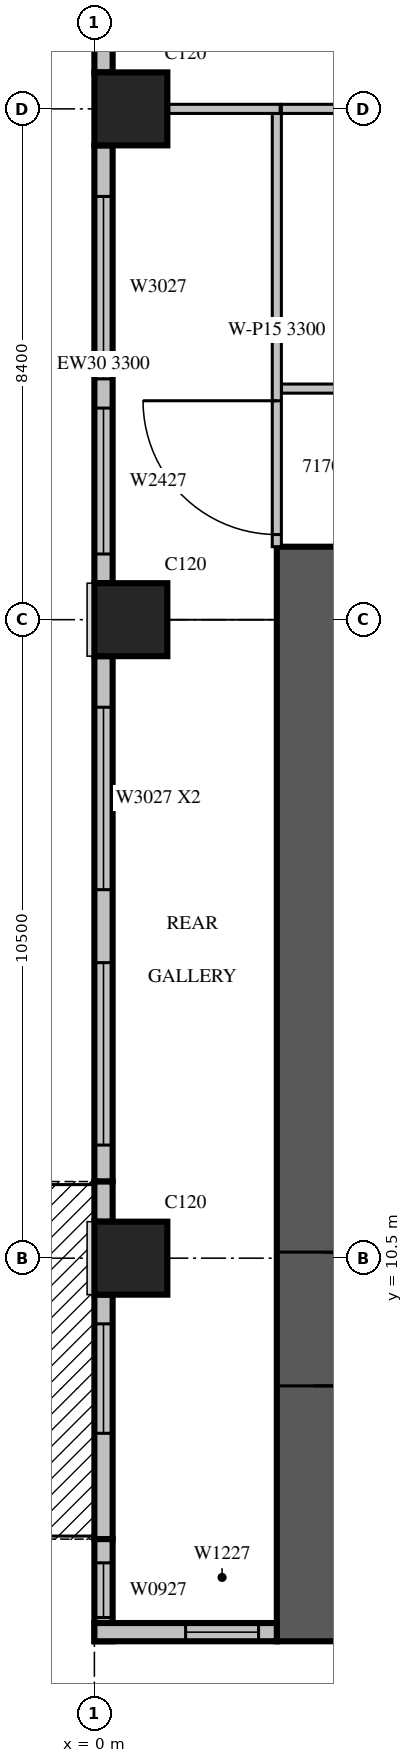
"""IFC4 building model, lengths in metres.
Left out: names, types, materials, properties, quantities, classifications, styles, units other than length and angle.
Written with IfcOpenShell. Run it as: python <this file> out.ifc"""

import sys

from ifc_helpers import new_model, si_unit, direction, frame, frame_2d, origin, origin_2d, place, context, subcontext, project, spatial, rectangle, extrude, source, transform, mapped, element, fill, save


model = new_model("IFC4")
c1 = context("Model", 3, precision=1e-05, world=origin(), true_north=direction((0.0, 1.0)))
c2 = subcontext(c1, "Body", "Model", "MODEL_VIEW")
j1 = project(units=[si_unit("LENGTHUNIT", "METRE"), si_unit("PLANEANGLEUNIT", "RADIAN")], contexts=[c1])
p1 = place(None, origin())
s1 = spatial("IfcSite", under=j1, at=p1, CompositionType="ELEMENT")
p2 = place(p1, origin())
s2 = spatial("IfcBuilding", under=s1, at=p2, CompositionType="ELEMENT")
p3 = place(p2, frame((0.0, 0.0, 82.5)))
s3 = spatial("IfcBuildingStorey", under=s2, at=p3, CompositionType="ELEMENT", Elevation=82.5)
m1 = source(origin(), c2, "Body", "SweptSolid", [
    extrude(rectangle(XDim=1.2, YDim=1.2, at=origin_2d()), origin(), (0.0, 0.0, 1.0), 4.2),
])
for number, where, z_axis, x_axis in (
    (1, (0.6, 10.5, 0.0), (0.0, 0.0, 1.0), (1.0, 0.0, 0.0)),
    (2, (0.6, 21.0, 0.0), (0.0, 0.0, 1.0), (1.0, 0.0, 0.0)),
    (3, (0.6, 29.4, 0.0), (0.0, 0.0, 1.0), (1.0, 0.0, 0.0)),
):
    element("IfcColumn", number, at=place(p3, frame(where, z_axis=z_axis, x_axis=x_axis)), inside=s3, PredefinedType="COLUMN", context=c2, shape_type="MappedRepresentation", body=[
        mapped(m1, transform((0.0, 0.0, 0.0), scale=1.0)),
    ])
m2 = source(origin(), c2, "Body", "SweptSolid", [
    extrude(rectangle(XDim=18.0, YDim=1.2, at=frame_2d((9.0, 0.0))), origin(), (0.0, 0.0, 1.0), 4.2),
])
p4 = place(p3, frame((3.6, 4.2, 0.0), z_axis=(0.0, 0.0, 1.0), x_axis=(0.0, 1.0, 0.0)))
e4 = element("IfcWall", 4, at=p4, inside=s3, PredefinedType="SHEAR", context=c2, shape_type="MappedRepresentation", body=[
    mapped(m2, transform((0.0, 0.0, 0.0), scale=1.0)),
])
m3 = source(origin(), c2, "Body", "SweptSolid", [
    extrude(rectangle(XDim=2.2, YDim=2.1, at=frame_2d((1.1, 1.05))), frame((0.0, 0.61, 0.0), z_axis=(0.0, -1.0, 0.0), x_axis=(1.0, 0.0, 0.0)), (0.0, 0.0, 1.0), 1.22),
])
p5 = place(p4, frame((4.2, 0.0, 0.0)))
e5 = element("IfcOpeningElement", 5, at=p5, cuts=e4, PredefinedType="OPENING", context=c2, shape_type="MappedRepresentation", body=[
    mapped(m3, transform((0.0, 0.0, 0.0), scale=1.0)),
])
m4 = source(origin(), c2, "Body", "SweptSolid", [
    extrude(rectangle(XDim=7.2, YDim=0.3, at=frame_2d((3.6, 0.0))), origin(), (0.0, 0.0, 1.0), 3.8),
])
p6 = place(p3, frame((0.15, 37.2, 0.0), z_axis=(0.0, 0.0, 1.0), x_axis=(0.0, -1.0, 0.0)))
e6 = element("IfcWall", 6, at=p6, inside=s3, PredefinedType="STANDARD", context=c2, shape_type="MappedRepresentation", body=[
    mapped(m4, transform((0.0, 0.0, 0.0), scale=1.0)),
])
m5 = source(origin(), c2, "Body", "SweptSolid", [
    extrude(rectangle(XDim=1.8, YDim=2.7, at=frame_2d((0.9, 1.35))), frame((0.0, 0.16, 0.0), z_axis=(0.0, -1.0, 0.0), x_axis=(1.0, 0.0, 0.0)), (0.0, 0.0, 1.0), 0.32),
])
p7 = place(p6, frame((1.008, 0.0, 0.6)))
e7 = element("IfcOpeningElement", 7, at=p7, cuts=e6, PredefinedType="OPENING", context=c2, shape_type="MappedRepresentation", body=[
    mapped(m5, transform((0.0, 0.0, 0.0), scale=1.0)),
])
m6 = source(origin(), c2, "Body", "SweptSolid", [
    extrude(rectangle(XDim=2.4, YDim=2.7, at=frame_2d((1.2, 1.35))), frame((0.0, 0.16, 0.0), z_axis=(0.0, -1.0, 0.0), x_axis=(1.0, 0.0, 0.0)), (0.0, 0.0, 1.0), 0.32),
])
p8 = place(p6, frame((3.804, 0.0, 0.6)))
e8 = element("IfcOpeningElement", 8, at=p8, cuts=e6, PredefinedType="OPENING", context=c2, shape_type="MappedRepresentation", body=[
    mapped(m6, transform((0.0, 0.0, 0.0), scale=1.0)),
])
m7 = source(origin(), c2, "Body", "SweptSolid", [
    extrude(rectangle(XDim=7.2, YDim=0.3, at=frame_2d((3.6, 0.0))), origin(), (0.0, 0.0, 1.0), 3.3),
])
p9 = place(p3, frame((0.15, 28.8, 0.0), z_axis=(0.0, 0.0, 1.0), x_axis=(0.0, -1.0, 0.0)))
e9 = element("IfcWall", 9, at=p9, inside=s3, PredefinedType="STANDARD", context=c2, shape_type="MappedRepresentation", body=[
    mapped(m7, transform((0.0, 0.0, 0.0), scale=1.0)),
])
m8 = source(origin(), c2, "Body", "SweptSolid", [
    extrude(rectangle(XDim=3.0, YDim=2.7, at=frame_2d((1.5, 1.35))), frame((0.0, 0.16, 0.0), z_axis=(0.0, -1.0, 0.0), x_axis=(1.0, 0.0, 0.0)), (0.0, 0.0, 1.0), 0.32),
])
p10 = place(p9, frame((0.84, 0.0, 0.6)))
e10 = element("IfcOpeningElement", 10, at=p10, cuts=e9, PredefinedType="OPENING", context=c2, shape_type="MappedRepresentation", body=[
    mapped(m8, transform((0.0, 0.0, 0.0), scale=1.0)),
])
p11 = place(p9, frame((4.32, 0.0, 0.6)))
e11 = element("IfcOpeningElement", 11, at=p11, cuts=e9, PredefinedType="OPENING", context=c2, shape_type="MappedRepresentation", body=[
    mapped(m6, transform((0.0, 0.0, 0.0), scale=1.0)),
])
p12 = place(p3, frame((0.15, 20.4, 0.0), z_axis=(0.0, 0.0, 1.0), x_axis=(0.0, -1.0, 0.0)))
e12 = element("IfcWall", 12, at=p12, inside=s3, PredefinedType="STANDARD", context=c2, shape_type="SweptSolid", body=[
    extrude(rectangle(XDim=8.64, YDim=0.3, at=frame_2d((4.32, 0.0))), origin(), (0.0, 0.0, 1.0), 3.8),
])
p13 = place(p12, frame((0.84, 0.0, 0.6)))
e13 = element("IfcOpeningElement", 13, at=p13, cuts=e12, PredefinedType="OPENING", context=c2, shape_type="MappedRepresentation", body=[
    mapped(m8, transform((0.0, 0.0, 0.0), scale=1.0)),
])
p14 = place(p12, frame((5.04, 0.0, 0.6)))
e14 = element("IfcOpeningElement", 14, at=p14, cuts=e12, PredefinedType="OPENING", context=c2, shape_type="MappedRepresentation", body=[
    mapped(m8, transform((0.0, 0.0, 0.0), scale=1.0)),
])
p15 = place(p3, frame((0.15, 11.76, 0.0), z_axis=(0.0, 0.0, 1.0), x_axis=(0.0, -1.0, 0.0)))
e15 = element("IfcWall", 15, at=p15, inside=s3, PredefinedType="STANDARD", context=c2, shape_type="SweptSolid", body=[
    extrude(rectangle(XDim=0.66, YDim=0.3, at=frame_2d((0.33, 0.0))), origin(), (0.0, 0.0, 1.0), 3.8),
])
p16 = place(p3, frame((0.15, 9.9, 0.0), z_axis=(0.0, 0.0, 1.0), x_axis=(0.0, -1.0, 0.0)))
e16 = element("IfcWall", 16, at=p16, inside=s3, PredefinedType="STANDARD", context=c2, shape_type="SweptSolid", body=[
    extrude(rectangle(XDim=4.02, YDim=0.3, at=frame_2d((2.01, 0.0))), origin(), (0.0, 0.0, 1.0), 3.8),
])
m9 = source(origin(), c2, "Body", "SweptSolid", [
    extrude(rectangle(XDim=1.8, YDim=2.4, at=frame_2d((0.9, 1.2))), frame((0.0, 0.16, 0.0), z_axis=(0.0, -1.0, 0.0), x_axis=(1.0, 0.0, 0.0)), (0.0, 0.0, 1.0), 0.32),
])
p17 = place(p16, frame((0.48, 0.0, 0.0)))
e17 = element("IfcOpeningElement", 17, at=p17, cuts=e16, PredefinedType="OPENING", context=c2, shape_type="MappedRepresentation", body=[
    mapped(m9, transform((0.0, 0.0, 0.0), scale=1.0)),
])
m10 = source(origin(), c2, "Body", "SweptSolid", [
    extrude(rectangle(XDim=1.68, YDim=0.3, at=frame_2d((0.84, 0.0))), origin(), (0.0, 0.0, 1.0), 3.8),
])
p18 = place(p3, frame((0.15, 5.88, 0.0), z_axis=(0.0, 0.0, 1.0), x_axis=(0.0, -1.0, 0.0)))
e18 = element("IfcWall", 18, at=p18, inside=s3, PredefinedType="STANDARD", context=c2, shape_type="MappedRepresentation", body=[
    mapped(m10, transform((0.0, 0.0, 0.0), scale=1.0)),
])
m11 = source(origin(), c2, "Body", "SweptSolid", [
    extrude(rectangle(XDim=0.9, YDim=2.7, at=frame_2d((0.45, 1.35))), frame((0.0, 0.16, 0.0), z_axis=(0.0, -1.0, 0.0), x_axis=(1.0, 0.0, 0.0)), (0.0, 0.0, 1.0), 0.32),
])
p19 = place(p18, frame((0.39, 0.0, 0.6)))
e19 = element("IfcOpeningElement", 19, at=p19, cuts=e18, PredefinedType="OPENING", context=c2, shape_type="MappedRepresentation", body=[
    mapped(m11, transform((0.0, 0.0, 0.0), scale=1.0)),
])
m12 = source(origin(), c2, "Body", "SweptSolid", [
    extrude(rectangle(XDim=3.0, YDim=0.3, at=frame_2d((1.5, 0.0))), origin(), (0.0, 0.0, 1.0), 3.8),
])
p20 = place(p3, frame((0.0, 4.35, 0.0), z_axis=(0.0, 0.0, 1.0), x_axis=(1.0, 0.0, 0.0)))
e20 = element("IfcWall", 20, at=p20, inside=s3, PredefinedType="STANDARD", context=c2, shape_type="MappedRepresentation", body=[
    mapped(m12, transform((0.0, 0.0, 0.0), scale=1.0)),
])
m13 = source(origin(), c2, "Body", "SweptSolid", [
    extrude(rectangle(XDim=1.2, YDim=2.7, at=frame_2d((0.6, 1.35))), frame((0.0, 0.16, 0.0), z_axis=(0.0, -1.0, 0.0), x_axis=(1.0, 0.0, 0.0)), (0.0, 0.0, 1.0), 0.32),
])
p21 = place(p20, frame((1.5, 0.0, 0.6)))
e21 = element("IfcOpeningElement", 21, at=p21, cuts=e20, PredefinedType="OPENING", context=c2, shape_type="MappedRepresentation", body=[
    mapped(m13, transform((0.0, 0.0, 0.0), scale=1.0)),
])
m14 = source(origin(), c2, "Body", "SweptSolid", [
    extrude(rectangle(XDim=11.625, YDim=0.15, at=frame_2d((5.812, 0.0))), origin(), (0.0, 0.0, 1.0), 2.8),
])
p22 = place(p3, frame((3.075, 24.8, 0.0), z_axis=(0.0, 0.0, 1.0), x_axis=(1.0, 0.0, 0.0)))
e22 = element("IfcWall", 22, at=p22, inside=s3, PredefinedType="PARTITIONING", context=c2, shape_type="MappedRepresentation", body=[
    mapped(m14, transform((0.0, 0.0, 0.0), scale=1.0)),
])
m15 = source(origin(), c2, "Body", "SweptSolid", [
    extrude(rectangle(XDim=0.9, YDim=2.1, at=frame_2d((0.45, 1.05))), frame((0.0, 0.085, 0.0), z_axis=(0.0, -1.0, 0.0), x_axis=(1.0, 0.0, 0.0)), (0.0, 0.0, 1.0), 0.17),
])
p23 = place(p22, frame((2.663, 0.0, 0.0)))
e23 = element("IfcOpeningElement", 23, at=p23, cuts=e22, PredefinedType="OPENING", context=c2, shape_type="MappedRepresentation", body=[
    mapped(m15, transform((0.0, 0.0, 0.0), scale=1.0)),
])
p24 = place(p22, frame((9.35, 0.0, 0.0)))
e24 = element("IfcOpeningElement", 24, at=p24, cuts=e22, PredefinedType="OPENING", context=c2, shape_type="MappedRepresentation", body=[
    mapped(m15, transform((0.0, 0.0, 0.0), scale=1.0)),
])
m16 = source(origin(), c2, "Body", "SweptSolid", [
    extrude(rectangle(XDim=6.826, YDim=0.15, at=frame_2d((3.413, 0.0))), origin(), (0.0, 0.0, 1.0), 3.8),
])
p25 = place(p3, frame((9.901, 29.4, 0.0), z_axis=(0.0, 0.0, 1.0), x_axis=(-1.0, 0.0, 0.0)))
e25 = element("IfcWall", 25, at=p25, inside=s3, PredefinedType="PARTITIONING", context=c2, shape_type="MappedRepresentation", body=[
    mapped(m16, transform((0.0, 0.0, 0.0), scale=1.0)),
])
m17 = source(origin(), c2, "Body", "SweptSolid", [
    extrude(rectangle(XDim=7.125, YDim=0.15, at=frame_2d((3.562, 0.0))), origin(), (0.0, 0.0, 1.0), 3.3),
])
p26 = place(p3, frame((3.0, 29.325, 0.0), z_axis=(0.0, 0.0, 1.0), x_axis=(0.0, -1.0, 0.0)))
e26 = element("IfcWall", 26, at=p26, inside=s3, PredefinedType="PARTITIONING", context=c2, shape_type="MappedRepresentation", body=[
    mapped(m17, transform((0.0, 0.0, 0.0), scale=1.0)),
])
m18 = source(origin(), c2, "Body", "SweptSolid", [
    extrude(rectangle(XDim=2.2, YDim=2.1, at=frame_2d((1.1, 1.05))), frame((0.0, 0.085, 0.0), z_axis=(0.0, -1.0, 0.0), x_axis=(1.0, 0.0, 0.0)), (0.0, 0.0, 1.0), 0.17),
])
p27 = place(p26, frame((4.725, 0.0, 0.0)))
e27 = element("IfcOpeningElement", 27, at=p27, cuts=e26, PredefinedType="OPENING", context=c2, shape_type="MappedRepresentation", body=[
    mapped(m18, transform((0.0, 0.0, 0.0), scale=1.0)),
])
m19 = source(origin(), c2, "Body", "SweptSolid", [
    extrude(rectangle(XDim=1.856, YDim=0.15, at=frame_2d((0.928, 0.0))), origin(), (0.0, 0.0, 1.0), 3.8),
])
p28 = place(p3, frame((3.055, 29.4, 0.0), z_axis=(0.0, 0.0, 1.0), x_axis=(-1.0, 0.0, 0.0)))
e28 = element("IfcWall", 28, at=p28, inside=s3, PredefinedType="PARTITIONING", context=c2, shape_type="MappedRepresentation", body=[
    mapped(m19, transform((0.0, 0.0, 0.0), scale=1.0)),
])
m20 = source(origin(), c2, "Body", "SweptSolid", [
    extrude(rectangle(XDim=3.0, YDim=2.7, at=frame_2d((1.5, 1.35))), frame((0.0, 0.03, 0.0), z_axis=(0.0, -1.0, 0.0), x_axis=(1.0, 0.0, 0.0)), (0.0, 0.0, 1.0), 0.06),
])
p29 = place(p10, origin())
e29 = element("IfcWindow", 29, at=p29, inside=s3, PartitioningType="SINGLE_PANEL", PredefinedType="WINDOW", context=c2, shape_type="MappedRepresentation", body=[
    mapped(m20, transform((0.0, 0.0, 0.0), scale=1.0)),
])
fill(e10, e29)
p30 = place(p13, origin())
e30 = element("IfcWindow", 30, at=p30, inside=s3, PartitioningType="SINGLE_PANEL", PredefinedType="WINDOW", context=c2, shape_type="MappedRepresentation", body=[
    mapped(m20, transform((0.0, 0.0, 0.0), scale=1.0)),
])
fill(e13, e30)
p31 = place(p14, origin())
e31 = element("IfcWindow", 31, at=p31, inside=s3, PartitioningType="SINGLE_PANEL", PredefinedType="WINDOW", context=c2, shape_type="MappedRepresentation", body=[
    mapped(m20, transform((0.0, 0.0, 0.0), scale=1.0)),
])
fill(e14, e31)
m21 = source(origin(), c2, "Body", "SweptSolid", [
    extrude(rectangle(XDim=2.4, YDim=2.7, at=frame_2d((1.2, 1.35))), frame((0.0, 0.03, 0.0), z_axis=(0.0, -1.0, 0.0), x_axis=(1.0, 0.0, 0.0)), (0.0, 0.0, 1.0), 0.06),
])
p32 = place(p11, origin())
e32 = element("IfcWindow", 32, at=p32, inside=s3, PartitioningType="SINGLE_PANEL", PredefinedType="WINDOW", context=c2, shape_type="MappedRepresentation", body=[
    mapped(m21, transform((0.0, 0.0, 0.0), scale=1.0)),
])
fill(e11, e32)
m22 = source(origin(), c2, "Body", "SweptSolid", [
    extrude(rectangle(XDim=1.8, YDim=2.4, at=frame_2d((0.9, 1.2))), frame((0.0, 0.025, 0.0), z_axis=(0.0, -1.0, 0.0), x_axis=(1.0, 0.0, 0.0)), (0.0, 0.0, 1.0), 0.05),
])
p33 = place(p17, origin())
e33 = element("IfcDoor", 33, at=p33, inside=s3, OperationType="SLIDING_TO_LEFT", PredefinedType="DOOR", context=c2, shape_type="MappedRepresentation", body=[
    mapped(m22, transform((0.0, 0.0, 0.0), scale=1.0)),
])
fill(e17, e33)
m23 = source(origin(), c2, "Body", "SweptSolid", [
    extrude(rectangle(XDim=0.9, YDim=2.7, at=frame_2d((0.45, 1.35))), frame((0.0, 0.03, 0.0), z_axis=(0.0, -1.0, 0.0), x_axis=(1.0, 0.0, 0.0)), (0.0, 0.0, 1.0), 0.06),
])
p34 = place(p19, origin())
e34 = element("IfcWindow", 34, at=p34, inside=s3, PartitioningType="SINGLE_PANEL", PredefinedType="WINDOW", context=c2, shape_type="MappedRepresentation", body=[
    mapped(m23, transform((0.0, 0.0, 0.0), scale=1.0)),
])
fill(e19, e34)
m24 = source(origin(), c2, "Body", "SweptSolid", [
    extrude(rectangle(XDim=1.2, YDim=2.7, at=frame_2d((0.6, 1.35))), frame((0.0, 0.03, 0.0), z_axis=(0.0, -1.0, 0.0), x_axis=(1.0, 0.0, 0.0)), (0.0, 0.0, 1.0), 0.06),
])
p35 = place(p21, origin())
e35 = element("IfcWindow", 35, at=p35, inside=s3, PartitioningType="SINGLE_PANEL", PredefinedType="WINDOW", context=c2, shape_type="MappedRepresentation", body=[
    mapped(m24, transform((0.0, 0.0, 0.0), scale=1.0)),
])
fill(e21, e35)
m25 = source(origin(), c2, "Body", "SweptSolid", [
    extrude(rectangle(XDim=2.2, YDim=2.1, at=frame_2d((1.1, 1.05))), frame((0.0, 0.025, 0.0), z_axis=(0.0, -1.0, 0.0), x_axis=(1.0, 0.0, 0.0)), (0.0, 0.0, 1.0), 0.05),
])
p36 = place(p5, origin())
e36 = element("IfcDoor", 36, at=p36, inside=s3, OperationType="DOUBLE_DOOR_SINGLE_SWING", PredefinedType="DOOR", context=c2, shape_type="MappedRepresentation", body=[
    mapped(m25, transform((0.0, 0.0, 0.0), scale=1.0)),
])
fill(e5, e36)
p37 = place(p27, origin())
e37 = element("IfcDoor", 37, at=p37, inside=s3, OperationType="DOUBLE_DOOR_SINGLE_SWING", PredefinedType="DOOR", context=c2, shape_type="MappedRepresentation", body=[
    mapped(m25, transform((0.0, 0.0, 0.0), scale=1.0)),
])
fill(e27, e37)
save(model, sys.argv[1])
